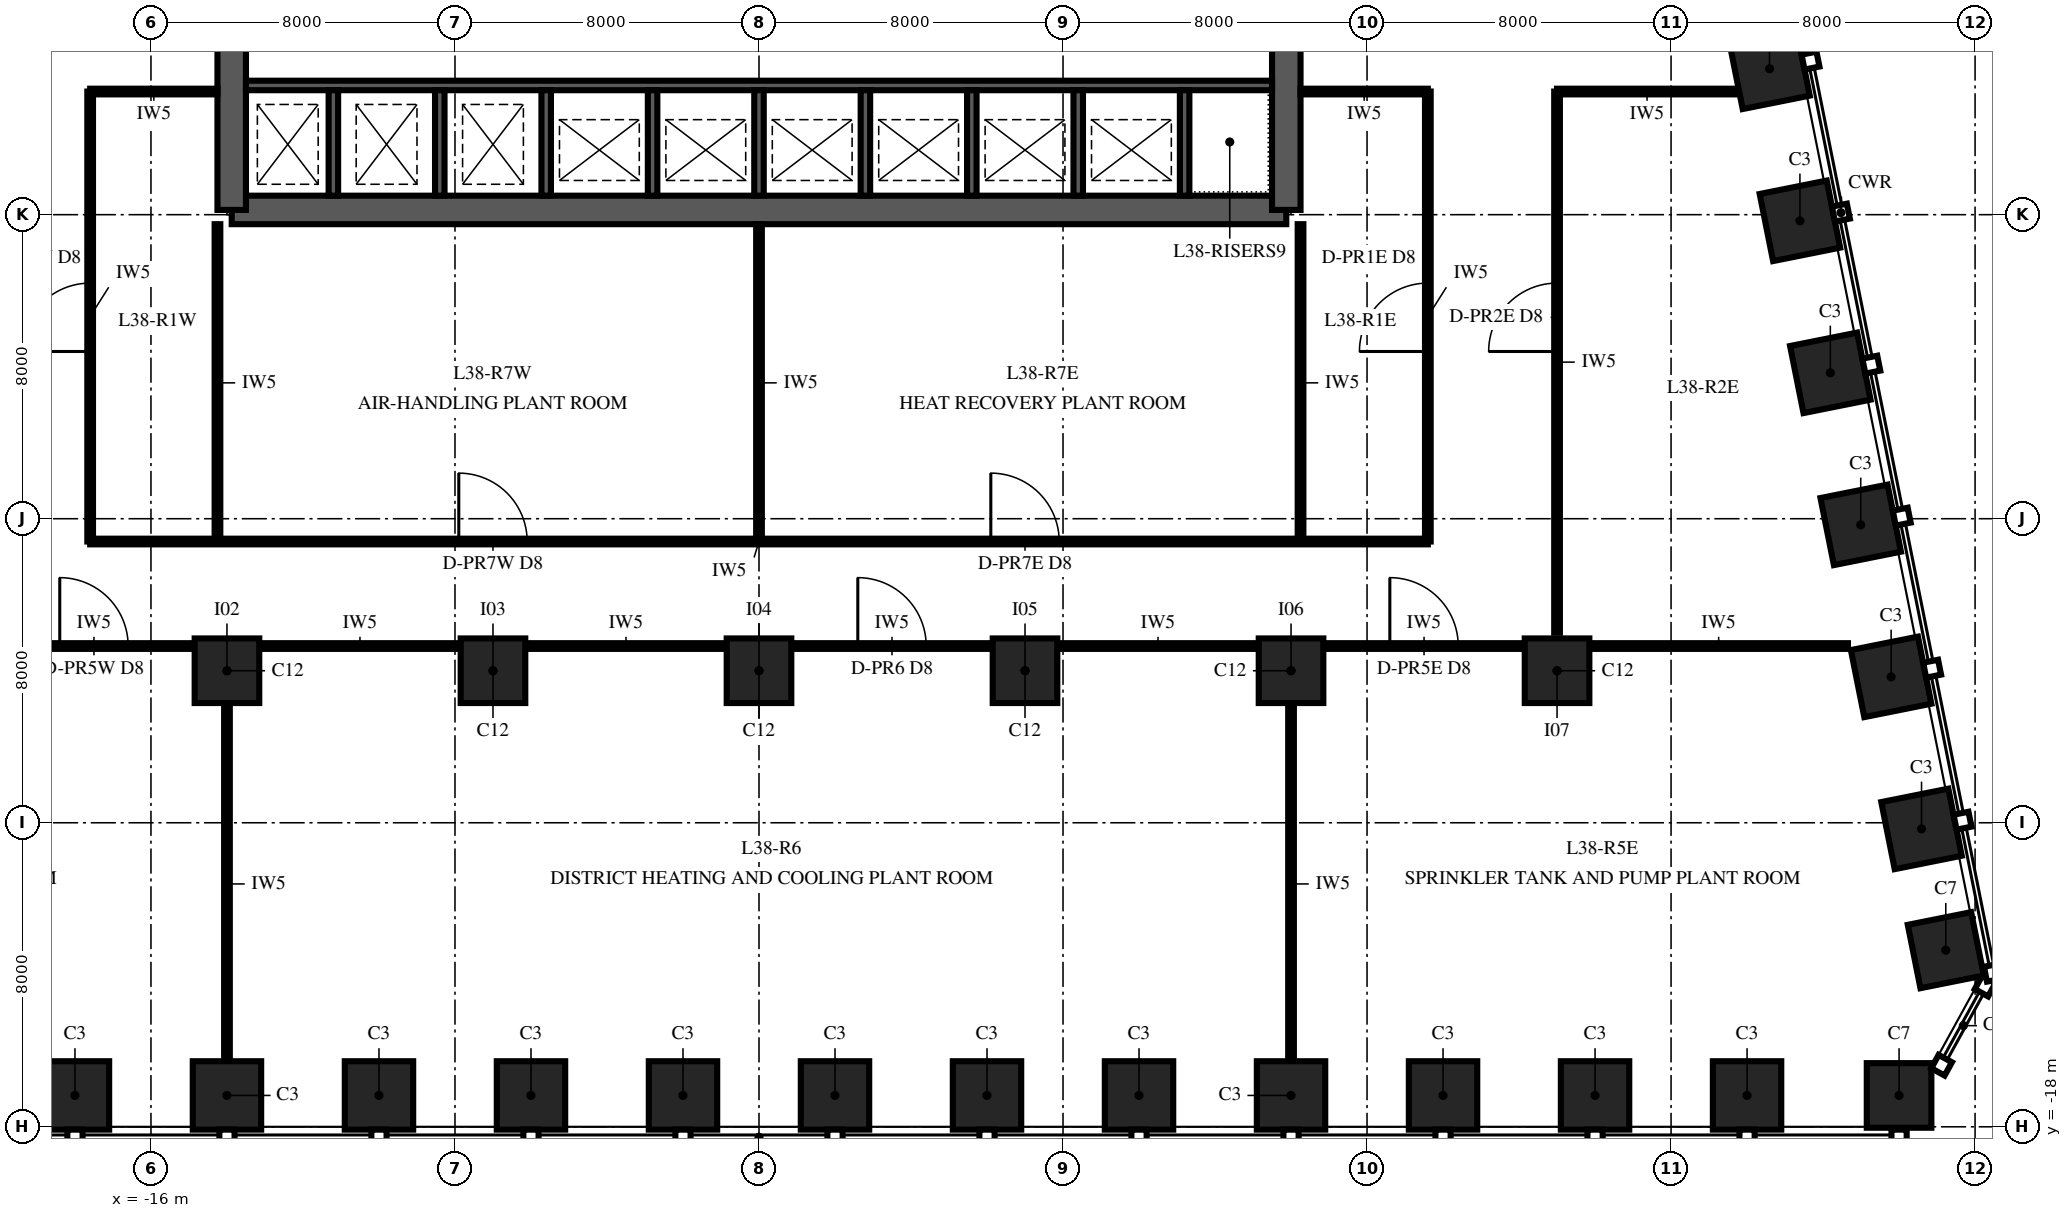
"""IFC4 building model, lengths in metres.
Left out: names, types, materials, properties, quantities, classifications, styles, units other than length and angle.
Written with IfcOpenShell. Run it as: python <this file> out.ifc"""

import sys

from ifc_helpers import new_model, si_unit, direction, frame, frame_2d, origin, origin_2d, place, context, subcontext, project, spatial, polyline, rectangle, outline, extrude, element, fill, save


model = new_model("IFC4")
c1 = context("Model", 3, precision=1e-05, world=origin(), true_north=direction((0.0, 1.0)))
c2 = subcontext(c1, "Body", "Model", "MODEL_VIEW")
j1 = project(units=[si_unit("LENGTHUNIT", "METRE"), si_unit("PLANEANGLEUNIT", "RADIAN")], contexts=[c1])
p1 = place(None, origin())
s1 = spatial("IfcSite", under=j1, at=p1, CompositionType="ELEMENT")
p2 = place(p1, origin())
s2 = spatial("IfcBuilding", under=s1, at=p2, CompositionType="ELEMENT")
p3 = place(p2, frame((0.0, 0.0, 167.0)))
s3 = spatial("IfcBuildingStorey", under=s2, at=p3, CompositionType="ELEMENT", Elevation=167.0)
for number, where, z_axis, x_axis in (
    (1, (-18.0, -17.175, 0.0), (0.0, 0.0, 1.0), (1.0, 0.0, 0.0)),
    (2, (-14.0, -17.175, 0.0), (0.0, 0.0, 1.0), (1.0, 0.0, 0.0)),
    (3, (-10.0, -17.175, 0.0), (0.0, 0.0, 1.0), (1.0, 0.0, 0.0)),
    (4, (-6.0, -17.175, 0.0), (0.0, 0.0, 1.0), (1.0, 0.0, 0.0)),
    (5, (-2.0, -17.175, 0.0), (0.0, 0.0, 1.0), (1.0, 0.0, 0.0)),
    (6, (2.0, -17.175, 0.0), (0.0, 0.0, 1.0), (1.0, 0.0, 0.0)),
    (7, (6.0, -17.175, 0.0), (0.0, 0.0, 1.0), (1.0, 0.0, 0.0)),
    (8, (10.0, -17.175, 0.0), (0.0, 0.0, 1.0), (1.0, 0.0, 0.0)),
    (9, (14.0, -17.175, 0.0), (0.0, 0.0, 1.0), (1.0, 0.0, 0.0)),
    (10, (18.0, -17.175, 0.0), (0.0, 0.0, 1.0), (1.0, 0.0, 0.0)),
    (11, (22.0, -17.175, 0.0), (0.0, 0.0, 1.0), (1.0, 0.0, 0.0)),
    (12, (26.0, -17.175, 0.0), (0.0, 0.0, 1.0), (1.0, 0.0, 0.0)),
):
    element("IfcColumn", number, at=place(p3, frame(where, z_axis=z_axis, x_axis=x_axis)), inside=s3, PredefinedType="COLUMN", context=c2, shape_type="SweptSolid", body=[
        extrude(rectangle(XDim=1.8, YDim=1.8, at=origin_2d()), origin(), (0.0, 0.0, 1.0), 6.0),
    ])
for number, where, z_axis, x_axis in (
    (13, (30.0, -17.175, 0.0), (0.0, 0.0, 1.0), (1.0, 0.0, 0.0)),
    (14, (31.229, -13.353, 0.0), (0.0, 0.0, 1.0), (-0.196, 0.981, 0.0)),
):
    element("IfcColumn", number, at=place(p3, frame(where, z_axis=z_axis, x_axis=x_axis)), inside=s3, PredefinedType="COLUMN", context=c2, shape_type="SweptSolid", body=[
        extrude(rectangle(XDim=1.7, YDim=1.7, at=origin_2d()), origin(), (0.0, 0.0, 1.0), 6.0),
    ])
for number, where, z_axis, x_axis in (
    (15, (30.591, -10.162, 0.0), (0.0, 0.0, 1.0), (-0.196, 0.981, 0.0)),
    (16, (29.791, -6.162, 0.0), (0.0, 0.0, 1.0), (-0.196, 0.981, 0.0)),
    (17, (28.991, -2.162, 0.0), (0.0, 0.0, 1.0), (-0.196, 0.981, 0.0)),
    (18, (28.191, 1.838, 0.0), (0.0, 0.0, 1.0), (-0.196, 0.981, 0.0)),
    (19, (27.391, 5.838, 0.0), (0.0, 0.0, 1.0), (-0.196, 0.981, 0.0)),
    (20, (26.591, 9.838, 0.0), (0.0, 0.0, 1.0), (-0.196, 0.981, 0.0)),
):
    element("IfcColumn", number, at=place(p3, frame(where, z_axis=z_axis, x_axis=x_axis)), inside=s3, PredefinedType="COLUMN", context=c2, shape_type="SweptSolid", body=[
        extrude(rectangle(XDim=1.8, YDim=1.8, at=origin_2d()), origin(), (0.0, 0.0, 1.0), 6.0),
    ])
for number, where, z_axis, x_axis in (
    (21, (-14.0, -6.0, 0.0), (0.0, 0.0, 1.0), (1.0, 0.0, 0.0)),
    (22, (-7.0, -6.0, 0.0), (0.0, 0.0, 1.0), (1.0, 0.0, 0.0)),
    (23, (0.0, -6.0, 0.0), (0.0, 0.0, 1.0), (1.0, 0.0, 0.0)),
    (24, (7.0, -6.0, 0.0), (0.0, 0.0, 1.0), (1.0, 0.0, 0.0)),
    (25, (14.0, -6.0, 0.0), (0.0, 0.0, 1.0), (1.0, 0.0, 0.0)),
    (26, (21.0, -6.0, 0.0), (0.0, 0.0, 1.0), (1.0, 0.0, 0.0)),
):
    element("IfcColumn", number, at=place(p3, frame(where, z_axis=z_axis, x_axis=x_axis)), inside=s3, PredefinedType="COLUMN", context=c2, shape_type="SweptSolid", body=[
        extrude(rectangle(XDim=1.7, YDim=1.7, at=origin_2d()), origin(), (0.0, 0.0, 1.0), 6.0),
    ])
p4 = place(p3, frame((-13.875, 6.125, 0.0), z_axis=(0.0, 0.0, 1.0), x_axis=(1.0, 0.0, 0.0)))
e27 = element("IfcWall", 27, at=p4, inside=s3, PredefinedType="SHEAR", context=c2, shape_type="SweptSolid", body=[
    extrude(rectangle(XDim=27.75, YDim=0.75, at=frame_2d((13.875, 0.0))), origin(), (0.0, 0.0, 1.0), 6.0),
])
for number, where, z_axis, x_axis in (
    (28, (13.875, 6.125, 0.0), (0.0, 0.0, 1.0), (0.0, 1.0, 0.0)),
    (29, (-13.875, 23.875, 0.0), (0.0, 0.0, 1.0), (0.0, -1.0, 0.0)),
):
    element("IfcWall", number, at=place(p3, frame(where, z_axis=z_axis, x_axis=x_axis)), inside=s3, PredefinedType="SHEAR", context=c2, shape_type="SweptSolid", body=[
        extrude(outline(polyline([(0.0, -0.375), (17.75, -0.375), (17.75, 0.0), (17.375, 0.0), (17.375, 0.375), (0.375, 0.375), (0.375, 0.0), (0.0, 0.0), (0.0, -0.375)])), origin(), (0.0, 0.0, 1.0), 6.0),
    ])
p5 = place(p3, frame((-13.5, 9.4, 0.0), z_axis=(0.0, 0.0, 1.0), x_axis=(1.0, 0.0, 0.0)))
e30 = element("IfcWall", 30, at=p5, inside=s3, PredefinedType="SHEAR", context=c2, shape_type="SweptSolid", body=[
    extrude(rectangle(XDim=27.0, YDim=0.25, at=frame_2d((13.5, 0.0))), origin(), (0.0, 0.0, 1.0), 6.0),
])
for number, where, z_axis, x_axis in (
    (31, (-11.2, 6.5, 0.0), (0.0, 0.0, 1.0), (0.0, 1.0, 0.0)),
    (32, (-8.4, 6.5, 0.0), (0.0, 0.0, 1.0), (0.0, 1.0, 0.0)),
    (33, (-5.6, 6.5, 0.0), (0.0, 0.0, 1.0), (0.0, 1.0, 0.0)),
    (34, (-2.8, 6.5, 0.0), (0.0, 0.0, 1.0), (0.0, 1.0, 0.0)),
    (35, (0.0, 6.5, 0.0), (0.0, 0.0, 1.0), (0.0, 1.0, 0.0)),
    (36, (2.8, 6.5, 0.0), (0.0, 0.0, 1.0), (0.0, 1.0, 0.0)),
    (37, (5.6, 6.5, 0.0), (0.0, 0.0, 1.0), (0.0, 1.0, 0.0)),
    (38, (8.4, 6.5, 0.0), (0.0, 0.0, 1.0), (0.0, 1.0, 0.0)),
    (39, (11.2, 6.5, 0.0), (0.0, 0.0, 1.0), (0.0, 1.0, 0.0)),
):
    element("IfcWall", number, at=place(p3, frame(where, z_axis=z_axis, x_axis=x_axis)), inside=s3, PredefinedType="SHEAR", context=c2, shape_type="SweptSolid", body=[
        extrude(rectangle(XDim=2.775, YDim=0.25, at=frame_2d((1.387, 0.0))), origin(), (0.0, 0.0, 1.0), 6.0),
    ])
p6 = place(p3, frame((17.6, -2.6, 0.0), z_axis=(0.0, 0.0, 1.0), x_axis=(0.0, 1.0, 0.0)))
e40 = element("IfcWall", 40, at=p6, inside=s3, PredefinedType="PARTITIONING", context=c2, shape_type="SweptSolid", body=[
    extrude(rectangle(XDim=11.84, YDim=0.15, at=frame_2d((5.92, 0.0))), origin(), (0.0, 0.0, 1.0), 5.8),
])
p7 = place(p6, frame((5.0, 0.0, 0.0)))
e41 = element("IfcOpeningElement", 41, at=p7, cuts=e40, PredefinedType="OPENING", context=c2, shape_type="SweptSolid", body=[
    extrude(rectangle(XDim=1.8, YDim=2.4, at=frame_2d((0.9, 1.2))), frame((0.0, 0.09, 0.0), z_axis=(0.0, -1.0, 0.0), x_axis=(1.0, 0.0, 0.0)), (0.0, 0.0, 1.0), 0.18),
])
p8 = place(p3, frame((21.0, -5.0, 0.0), z_axis=(0.0, 0.0, 1.0), x_axis=(0.0, 1.0, 0.0)))
e42 = element("IfcWall", 42, at=p8, inside=s3, PredefinedType="PARTITIONING", context=c2, shape_type="SweptSolid", body=[
    extrude(rectangle(XDim=14.24, YDim=0.15, at=frame_2d((7.12, 0.0))), origin(), (0.0, 0.0, 1.0), 5.8),
])
p9 = place(p8, frame((7.4, 0.0, 0.0)))
e43 = element("IfcOpeningElement", 43, at=p9, cuts=e42, PredefinedType="OPENING", context=c2, shape_type="SweptSolid", body=[
    extrude(rectangle(XDim=1.8, YDim=2.4, at=frame_2d((0.9, 1.2))), frame((0.0, 0.09, 0.0), z_axis=(0.0, -1.0, 0.0), x_axis=(1.0, 0.0, 0.0)), (0.0, 0.0, 1.0), 0.18),
])
p10 = place(p3, frame((14.25, -2.6, 0.0), z_axis=(0.0, 0.0, 1.0), x_axis=(0.0, 1.0, 0.0)))
e44 = element("IfcWall", 44, at=p10, inside=s3, PredefinedType="PARTITIONING", context=c2, shape_type="SweptSolid", body=[
    extrude(rectangle(XDim=8.35, YDim=0.15, at=frame_2d((4.175, 0.0))), origin(), (0.0, 0.0, 1.0), 5.8),
])
p11 = place(p3, frame((14.25, 9.24, 0.0), z_axis=(0.0, 0.0, 1.0), x_axis=(1.0, 0.0, 0.0)))
e45 = element("IfcWall", 45, at=p11, inside=s3, PredefinedType="PARTITIONING", context=c2, shape_type="SweptSolid", body=[
    extrude(rectangle(XDim=3.35, YDim=0.15, at=frame_2d((1.675, 0.0))), origin(), (0.0, 0.0, 1.0), 5.18),
])
p12 = place(p3, frame((21.0, 9.24, 0.0), z_axis=(0.0, 0.0, 1.0), x_axis=(1.0, 0.0, 0.0)))
e46 = element("IfcWall", 46, at=p12, inside=s3, PredefinedType="PARTITIONING", context=c2, shape_type="SweptSolid", body=[
    extrude(rectangle(XDim=4.737, YDim=0.15, at=frame_2d((2.368, 0.0))), origin(), (0.0, 0.0, 1.0), 5.8),
])
p13 = place(p3, frame((14.0, -7.0, 0.0), z_axis=(0.0, 0.0, 1.0), x_axis=(0.0, -1.0, 0.0)))
e47 = element("IfcWall", 47, at=p13, inside=s3, PredefinedType="PARTITIONING", context=c2, shape_type="SweptSolid", body=[
    extrude(rectangle(XDim=9.22, YDim=0.15, at=frame_2d((4.61, 0.0))), origin(), (0.0, 0.0, 1.0), 5.18),
])
p14 = place(p3, frame((-17.6, -2.6, 0.0), z_axis=(0.0, 0.0, 1.0), x_axis=(0.0, 1.0, 0.0)))
e48 = element("IfcWall", 48, at=p14, inside=s3, PredefinedType="PARTITIONING", context=c2, shape_type="SweptSolid", body=[
    extrude(rectangle(XDim=11.84, YDim=0.15, at=frame_2d((5.92, 0.0))), origin(), (0.0, 0.0, 1.0), 5.8),
])
p15 = place(p14, frame((5.0, 0.0, 0.0)))
e49 = element("IfcOpeningElement", 49, at=p15, cuts=e48, PredefinedType="OPENING", context=c2, shape_type="SweptSolid", body=[
    extrude(rectangle(XDim=1.8, YDim=2.4, at=frame_2d((0.9, 1.2))), frame((0.0, 0.09, 0.0), z_axis=(0.0, -1.0, 0.0), x_axis=(1.0, 0.0, 0.0)), (0.0, 0.0, 1.0), 0.18),
])
p16 = place(p3, frame((-14.25, -2.6, 0.0), z_axis=(0.0, 0.0, 1.0), x_axis=(0.0, 1.0, 0.0)))
e50 = element("IfcWall", 50, at=p16, inside=s3, PredefinedType="PARTITIONING", context=c2, shape_type="SweptSolid", body=[
    extrude(rectangle(XDim=8.35, YDim=0.15, at=frame_2d((4.175, 0.0))), origin(), (0.0, 0.0, 1.0), 5.8),
])
p17 = place(p3, frame((-14.25, 9.24, 0.0), z_axis=(0.0, 0.0, 1.0), x_axis=(-1.0, 0.0, 0.0)))
e51 = element("IfcWall", 51, at=p17, inside=s3, PredefinedType="PARTITIONING", context=c2, shape_type="SweptSolid", body=[
    extrude(rectangle(XDim=3.35, YDim=0.15, at=frame_2d((1.675, 0.0))), origin(), (0.0, 0.0, 1.0), 5.18),
])
p18 = place(p3, frame((-14.0, -7.0, 0.0), z_axis=(0.0, 0.0, 1.0), x_axis=(0.0, -1.0, 0.0)))
e52 = element("IfcWall", 52, at=p18, inside=s3, PredefinedType="PARTITIONING", context=c2, shape_type="SweptSolid", body=[
    extrude(rectangle(XDim=9.22, YDim=0.15, at=frame_2d((4.61, 0.0))), origin(), (0.0, 0.0, 1.0), 5.18),
])
p19 = place(p3, frame((-20.15, -5.35, 0.0), z_axis=(0.0, 0.0, 1.0), x_axis=(1.0, 0.0, 0.0)))
e53 = element("IfcWall", 53, at=p19, inside=s3, PredefinedType="PARTITIONING", context=c2, shape_type="SweptSolid", body=[
    extrude(rectangle(XDim=5.3, YDim=0.15, at=frame_2d((2.65, 0.0))), origin(), (0.0, 0.0, 1.0), 5.8),
])
p20 = place(p19, frame((1.75, 0.0, 0.0)))
e54 = element("IfcOpeningElement", 54, at=p20, cuts=e53, PredefinedType="OPENING", context=c2, shape_type="SweptSolid", body=[
    extrude(rectangle(XDim=1.8, YDim=2.4, at=frame_2d((0.9, 1.2))), frame((0.0, 0.09, 0.0), z_axis=(0.0, -1.0, 0.0), x_axis=(1.0, 0.0, 0.0)), (0.0, 0.0, 1.0), 0.18),
])
for number, where, z_axis, x_axis in (
    (55, (-13.15, -5.35, 0.0), (0.0, 0.0, 1.0), (1.0, 0.0, 0.0)),
    (56, (-6.15, -5.35, 0.0), (0.0, 0.0, 1.0), (1.0, 0.0, 0.0)),
):
    element("IfcWall", number, at=place(p3, frame(where, z_axis=z_axis, x_axis=x_axis)), inside=s3, PredefinedType="PARTITIONING", context=c2, shape_type="SweptSolid", body=[
        extrude(rectangle(XDim=5.3, YDim=0.15, at=frame_2d((2.65, 0.0))), origin(), (0.0, 0.0, 1.0), 5.8),
    ])
p21 = place(p3, frame((0.85, -5.35, 0.0), z_axis=(0.0, 0.0, 1.0), x_axis=(1.0, 0.0, 0.0)))
e57 = element("IfcWall", 57, at=p21, inside=s3, PredefinedType="PARTITIONING", context=c2, shape_type="SweptSolid", body=[
    extrude(rectangle(XDim=5.3, YDim=0.15, at=frame_2d((2.65, 0.0))), origin(), (0.0, 0.0, 1.0), 5.8),
])
p22 = place(p21, frame((1.75, 0.0, 0.0)))
e58 = element("IfcOpeningElement", 58, at=p22, cuts=e57, PredefinedType="OPENING", context=c2, shape_type="SweptSolid", body=[
    extrude(rectangle(XDim=1.8, YDim=2.4, at=frame_2d((0.9, 1.2))), frame((0.0, 0.09, 0.0), z_axis=(0.0, -1.0, 0.0), x_axis=(1.0, 0.0, 0.0)), (0.0, 0.0, 1.0), 0.18),
])
p23 = place(p3, frame((7.85, -5.35, 0.0), z_axis=(0.0, 0.0, 1.0), x_axis=(1.0, 0.0, 0.0)))
e59 = element("IfcWall", 59, at=p23, inside=s3, PredefinedType="PARTITIONING", context=c2, shape_type="SweptSolid", body=[
    extrude(rectangle(XDim=5.3, YDim=0.15, at=frame_2d((2.65, 0.0))), origin(), (0.0, 0.0, 1.0), 5.8),
])
p24 = place(p3, frame((14.85, -5.35, 0.0), z_axis=(0.0, 0.0, 1.0), x_axis=(1.0, 0.0, 0.0)))
e60 = element("IfcWall", 60, at=p24, inside=s3, PredefinedType="PARTITIONING", context=c2, shape_type="SweptSolid", body=[
    extrude(rectangle(XDim=5.3, YDim=0.15, at=frame_2d((2.65, 0.0))), origin(), (0.0, 0.0, 1.0), 5.8),
])
p25 = place(p24, frame((1.75, 0.0, 0.0)))
e61 = element("IfcOpeningElement", 61, at=p25, cuts=e60, PredefinedType="OPENING", context=c2, shape_type="SweptSolid", body=[
    extrude(rectangle(XDim=1.8, YDim=2.4, at=frame_2d((0.9, 1.2))), frame((0.0, 0.09, 0.0), z_axis=(0.0, -1.0, 0.0), x_axis=(1.0, 0.0, 0.0)), (0.0, 0.0, 1.0), 0.18),
])
p26 = place(p3, frame((21.85, -5.35, 0.0), z_axis=(0.0, 0.0, 1.0), x_axis=(1.0, 0.0, 0.0)))
e62 = element("IfcWall", 62, at=p26, inside=s3, PredefinedType="PARTITIONING", context=c2, shape_type="SweptSolid", body=[
    extrude(rectangle(XDim=6.805, YDim=0.15, at=frame_2d((3.402, 0.0))), origin(), (0.0, 0.0, 1.0), 5.8),
])
p27 = place(p3, frame((-17.6, -2.6, 0.0), z_axis=(0.0, 0.0, 1.0), x_axis=(1.0, 0.0, 0.0)))
e63 = element("IfcWall", 63, at=p27, inside=s3, PredefinedType="PARTITIONING", context=c2, shape_type="SweptSolid", body=[
    extrude(rectangle(XDim=35.2, YDim=0.15, at=frame_2d((17.6, 0.0))), origin(), (0.0, 0.0, 1.0), 5.8),
])
p28 = place(p27, frame((9.7, 0.0, 0.0)))
e64 = element("IfcOpeningElement", 64, at=p28, cuts=e63, PredefinedType="OPENING", context=c2, shape_type="SweptSolid", body=[
    extrude(rectangle(XDim=1.8, YDim=2.4, at=frame_2d((0.9, 1.2))), frame((0.0, 0.09, 0.0), z_axis=(0.0, -1.0, 0.0), x_axis=(1.0, 0.0, 0.0)), (0.0, 0.0, 1.0), 0.18),
])
p29 = place(p27, frame((23.7, 0.0, 0.0)))
e65 = element("IfcOpeningElement", 65, at=p29, cuts=e63, PredefinedType="OPENING", context=c2, shape_type="SweptSolid", body=[
    extrude(rectangle(XDim=1.8, YDim=2.4, at=frame_2d((0.9, 1.2))), frame((0.0, 0.09, 0.0), z_axis=(0.0, -1.0, 0.0), x_axis=(1.0, 0.0, 0.0)), (0.0, 0.0, 1.0), 0.18),
])
p30 = place(p3, frame((0.0, -2.6, 0.0), z_axis=(0.0, 0.0, 1.0), x_axis=(0.0, 1.0, 0.0)))
e66 = element("IfcWall", 66, at=p30, inside=s3, PredefinedType="PARTITIONING", context=c2, shape_type="SweptSolid", body=[
    extrude(rectangle(XDim=8.35, YDim=0.15, at=frame_2d((4.175, 0.0))), origin(), (0.0, 0.0, 1.0), 5.8),
])
p31 = place(p7, origin())
e67 = element("IfcDoor", 67, at=p31, inside=s3, OperationType="DOUBLE_DOOR_SINGLE_SWING", PredefinedType="DOOR", context=c2, shape_type="SweptSolid", body=[
    extrude(rectangle(XDim=1.8, YDim=2.4, at=frame_2d((0.9, 1.2))), frame((0.0, 0.075, 0.0), z_axis=(0.0, -1.0, 0.0), x_axis=(1.0, 0.0, 0.0)), (0.0, 0.0, 1.0), 0.149),
])
fill(e41, e67)
p32 = place(p9, origin())
e68 = element("IfcDoor", 68, at=p32, inside=s3, OperationType="DOUBLE_DOOR_SINGLE_SWING", PredefinedType="DOOR", context=c2, shape_type="SweptSolid", body=[
    extrude(rectangle(XDim=1.8, YDim=2.4, at=frame_2d((0.9, 1.2))), frame((0.0, 0.075, 0.0), z_axis=(0.0, -1.0, 0.0), x_axis=(1.0, 0.0, 0.0)), (0.0, 0.0, 1.0), 0.149),
])
fill(e43, e68)
p33 = place(p15, origin())
e69 = element("IfcDoor", 69, at=p33, inside=s3, OperationType="DOUBLE_DOOR_SINGLE_SWING", PredefinedType="DOOR", context=c2, shape_type="SweptSolid", body=[
    extrude(rectangle(XDim=1.8, YDim=2.4, at=frame_2d((0.9, 1.2))), frame((0.0, 0.075, 0.0), z_axis=(0.0, -1.0, 0.0), x_axis=(1.0, 0.0, 0.0)), (0.0, 0.0, 1.0), 0.149),
])
fill(e49, e69)
p34 = place(p25, origin())
e70 = element("IfcDoor", 70, at=p34, inside=s3, OperationType="DOUBLE_DOOR_SINGLE_SWING", PredefinedType="DOOR", context=c2, shape_type="SweptSolid", body=[
    extrude(rectangle(XDim=1.8, YDim=2.4, at=frame_2d((0.9, 1.2))), frame((0.0, 0.075, 0.0), z_axis=(0.0, -1.0, 0.0), x_axis=(1.0, 0.0, 0.0)), (0.0, 0.0, 1.0), 0.149),
])
fill(e61, e70)
p35 = place(p20, origin())
e71 = element("IfcDoor", 71, at=p35, inside=s3, OperationType="DOUBLE_DOOR_SINGLE_SWING", PredefinedType="DOOR", context=c2, shape_type="SweptSolid", body=[
    extrude(rectangle(XDim=1.8, YDim=2.4, at=frame_2d((0.9, 1.2))), frame((0.0, 0.075, 0.0), z_axis=(0.0, -1.0, 0.0), x_axis=(1.0, 0.0, 0.0)), (0.0, 0.0, 1.0), 0.149),
])
fill(e54, e71)
p36 = place(p22, origin())
e72 = element("IfcDoor", 72, at=p36, inside=s3, OperationType="DOUBLE_DOOR_SINGLE_SWING", PredefinedType="DOOR", context=c2, shape_type="SweptSolid", body=[
    extrude(rectangle(XDim=1.8, YDim=2.4, at=frame_2d((0.9, 1.2))), frame((0.0, 0.075, 0.0), z_axis=(0.0, -1.0, 0.0), x_axis=(1.0, 0.0, 0.0)), (0.0, 0.0, 1.0), 0.149),
])
fill(e58, e72)
p37 = place(p28, origin())
e73 = element("IfcDoor", 73, at=p37, inside=s3, OperationType="DOUBLE_DOOR_SINGLE_SWING", PredefinedType="DOOR", context=c2, shape_type="SweptSolid", body=[
    extrude(rectangle(XDim=1.8, YDim=2.4, at=frame_2d((0.9, 1.2))), frame((0.0, 0.075, 0.0), z_axis=(0.0, -1.0, 0.0), x_axis=(1.0, 0.0, 0.0)), (0.0, 0.0, 1.0), 0.149),
])
fill(e64, e73)
p38 = place(p29, origin())
e74 = element("IfcDoor", 74, at=p38, inside=s3, OperationType="DOUBLE_DOOR_SINGLE_SWING", PredefinedType="DOOR", context=c2, shape_type="SweptSolid", body=[
    extrude(rectangle(XDim=1.8, YDim=2.4, at=frame_2d((0.9, 1.2))), frame((0.0, 0.075, 0.0), z_axis=(0.0, -1.0, 0.0), x_axis=(1.0, 0.0, 0.0)), (0.0, 0.0, 1.0), 0.149),
])
fill(e65, e74)
save(model, sys.argv[1])
